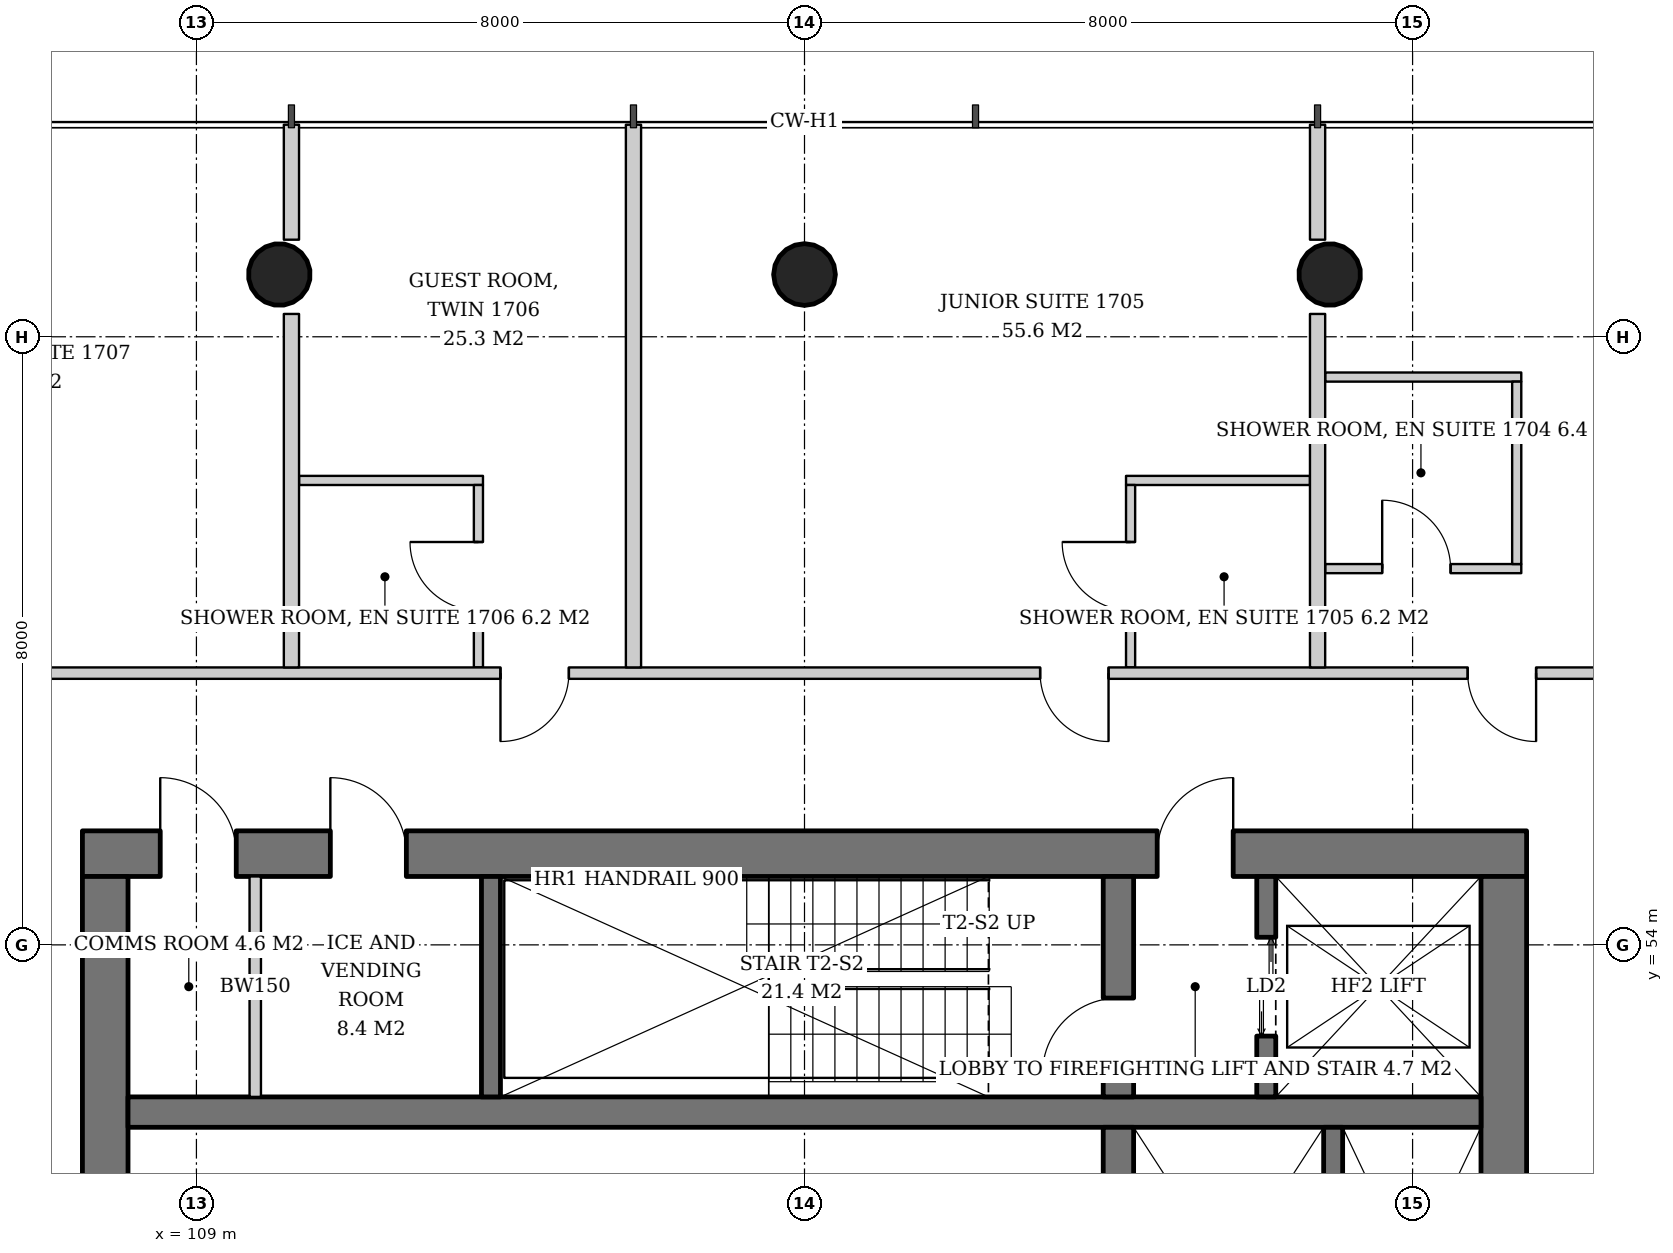
"""IFC4 building model, lengths in metres.
Left out: names, types, materials, properties, quantities, classifications, styles, units other than length and angle.
Written with IfcOpenShell. Run it as: python <this file> out.ifc"""

import sys

from ifc_helpers import new_model, si_unit, direction, frame, frame_2d, origin, origin_2d, place, context, subcontext, project, spatial, rectangle, hollow_circle, extrude, element, fill, save


model = new_model("IFC4")
c1 = context("Model", 3, precision=1e-05, world=origin(), true_north=direction((0.0, 1.0)))
c2 = subcontext(c1, "Body", "Model", "MODEL_VIEW")
j1 = project(units=[si_unit("LENGTHUNIT", "METRE"), si_unit("PLANEANGLEUNIT", "RADIAN")], contexts=[c1])
p1 = place(None, origin())
s1 = spatial("IfcSite", under=j1, at=p1, CompositionType="ELEMENT")
p2 = place(p1, origin())
s2 = spatial("IfcBuilding", under=s1, at=p2, CompositionType="ELEMENT")
p3 = place(p2, frame((0.0, 0.0, 70.4)))
s3 = spatial("IfcBuildingStorey", under=s2, at=p3, CompositionType="ELEMENT", Elevation=70.4)
p4 = place(p3, frame((123.935, 62.871, 0.0), z_axis=(-0.021497706284, -0.043059584825, 0.998841188968), x_axis=(0.894693706707, -0.446680166538, 0.0)))
e1 = element("IfcColumn", 1, at=p4, inside=s3, PredefinedType="COLUMN", context=c2, shape_type="SweptSolid", body=[
    extrude(hollow_circle(Radius=0.406, WallThickness=0.03, at=origin_2d()), origin(), (0.0, 0.0, 1.0), 3.804),
])
p5 = place(p3, frame((117.0, 62.871, 0.0), z_axis=(0.0, -0.043069538298, 0.999072076915), x_axis=(1.0, 0.0, 0.0)))
e2 = element("IfcColumn", 2, at=p5, inside=s3, PredefinedType="COLUMN", context=c2, shape_type="SweptSolid", body=[
    extrude(hollow_circle(Radius=0.406, WallThickness=0.03, at=origin_2d()), origin(), (0.0, 0.0, 1.0), 3.803),
])
p6 = place(p3, frame((110.065, 62.871, 0.0), z_axis=(0.021497706284, -0.043059584825, 0.998841188968), x_axis=(0.894693706707, 0.446680166538, 0.0)))
e3 = element("IfcColumn", 3, at=p6, inside=s3, PredefinedType="COLUMN", context=c2, shape_type="SweptSolid", body=[
    extrude(hollow_circle(Radius=0.406, WallThickness=0.03, at=origin_2d()), origin(), (0.0, 0.0, 1.0), 3.804),
])
p7 = place(p3, frame((107.5, 55.2, 0.0), z_axis=(0.0, 0.0, 1.0), x_axis=(1.0, 0.0, 0.0)))
e4 = element("IfcWall", 4, at=p7, inside=s3, PredefinedType="SHEAR", context=c2, shape_type="SweptSolid", body=[
    extrude(rectangle(XDim=19.0, YDim=0.6, at=frame_2d((9.5, 0.0))), origin(), (0.0, 0.0, 1.0), 3.8),
])
p8 = place(p7, frame((14.14, 0.0, 0.0)))
e5 = element("IfcOpeningElement", 5, at=p8, cuts=e4, PredefinedType="OPENING", context=c2, shape_type="SweptSolid", body=[
    extrude(rectangle(XDim=1.0, YDim=2.1, at=frame_2d((0.5, 1.05))), frame((0.0, 0.31, 0.0), z_axis=(0.0, -1.0, 0.0), x_axis=(1.0, 0.0, 0.0)), (0.0, 0.0, 1.0), 0.62),
])
p9 = place(p7, frame((1.024, 0.0, 0.0)))
e6 = element("IfcOpeningElement", 6, at=p9, cuts=e4, PredefinedType="OPENING", context=c2, shape_type="SweptSolid", body=[
    extrude(rectangle(XDim=1.0, YDim=2.1, at=frame_2d((0.5, 1.05))), frame((0.0, 0.31, 0.0), z_axis=(0.0, -1.0, 0.0), x_axis=(1.0, 0.0, 0.0)), (0.0, 0.0, 1.0), 0.62),
])
p10 = place(p7, frame((3.262, 0.0, 0.0)))
e7 = element("IfcOpeningElement", 7, at=p10, cuts=e4, PredefinedType="OPENING", context=c2, shape_type="SweptSolid", body=[
    extrude(rectangle(XDim=1.0, YDim=2.1, at=frame_2d((0.5, 1.05))), frame((0.0, 0.31, 0.0), z_axis=(0.0, -1.0, 0.0), x_axis=(1.0, 0.0, 0.0)), (0.0, 0.0, 1.0), 0.62),
])
p11 = place(p3, frame((107.8, 37.1, 0.0), z_axis=(0.0, 0.0, 1.0), x_axis=(0.0, 1.0, 0.0)))
e8 = element("IfcWall", 8, at=p11, inside=s3, PredefinedType="SHEAR", context=c2, shape_type="SweptSolid", body=[
    extrude(rectangle(XDim=17.8, YDim=0.6, at=frame_2d((8.9, 0.0))), origin(), (0.0, 0.0, 1.0), 3.8),
])
p12 = place(p11, frame((8.0, 0.0, 0.0)))
e9 = element("IfcOpeningElement", 9, at=p12, cuts=e8, PredefinedType="OPENING", context=c2, shape_type="SweptSolid", body=[
    extrude(rectangle(XDim=1.8, YDim=2.4, at=frame_2d((0.9, 1.2))), frame((0.0, 0.31, 0.0), z_axis=(0.0, -1.0, 0.0), x_axis=(1.0, 0.0, 0.0)), (0.0, 0.0, 1.0), 0.62),
])
p13 = place(p3, frame((126.2, 37.1, 0.0), z_axis=(0.0, 0.0, 1.0), x_axis=(0.0, 1.0, 0.0)))
e10 = element("IfcWall", 10, at=p13, inside=s3, PredefinedType="SHEAR", context=c2, shape_type="SweptSolid", body=[
    extrude(rectangle(XDim=17.8, YDim=0.6, at=frame_2d((8.9, 0.0))), origin(), (0.0, 0.0, 1.0), 3.8),
])
p14 = place(p13, frame((8.0, 0.0, 0.0)))
e11 = element("IfcOpeningElement", 11, at=p14, cuts=e10, PredefinedType="OPENING", context=c2, shape_type="SweptSolid", body=[
    extrude(rectangle(XDim=1.8, YDim=2.4, at=frame_2d((0.9, 1.2))), frame((0.0, 0.31, 0.0), z_axis=(0.0, -1.0, 0.0), x_axis=(1.0, 0.0, 0.0)), (0.0, 0.0, 1.0), 0.62),
])
p15 = place(p3, frame((108.1, 51.8, 0.0), z_axis=(0.0, 0.0, 1.0), x_axis=(1.0, 0.0, 0.0)))
e12 = element("IfcWall", 12, at=p15, inside=s3, PredefinedType="SHEAR", context=c2, shape_type="SweptSolid", body=[
    extrude(rectangle(XDim=17.8, YDim=0.4, at=frame_2d((8.9, 0.0))), origin(), (0.0, 0.0, 1.0), 3.8),
])
p16 = place(p3, frame((121.13, 40.4, 0.0), z_axis=(0.0, 0.0, 1.0), x_axis=(0.0, 1.0, 0.0)))
e13 = element("IfcWall", 13, at=p16, inside=s3, PredefinedType="SHEAR", context=c2, shape_type="SweptSolid", body=[
    extrude(rectangle(XDim=11.2, YDim=0.4, at=frame_2d((5.6, 0.0))), origin(), (0.0, 0.0, 1.0), 3.8),
])
p17 = place(p3, frame((121.13, 52.0, 0.0), z_axis=(0.0, 0.0, 1.0), x_axis=(0.0, 1.0, 0.0)))
e14 = element("IfcWall", 14, at=p17, inside=s3, PredefinedType="SHEAR", context=c2, shape_type="SweptSolid", body=[
    extrude(rectangle(XDim=2.9, YDim=0.4, at=frame_2d((1.45, 0.0))), origin(), (0.0, 0.0, 1.0), 3.8),
])
p18 = place(p17, frame((0.3, 0.0, 0.0)))
e15 = element("IfcOpeningElement", 15, at=p18, cuts=e14, PredefinedType="OPENING", context=c2, shape_type="SweptSolid", body=[
    extrude(rectangle(XDim=1.0, YDim=2.1, at=frame_2d((0.5, 1.05))), frame((0.0, 0.21, 0.0), z_axis=(0.0, -1.0, 0.0), x_axis=(1.0, 0.0, 0.0)), (0.0, 0.0, 1.0), 0.42),
])
p19 = place(p3, frame((112.875, 52.0, 0.0), z_axis=(0.0, 0.0, 1.0), x_axis=(0.0, 1.0, 0.0)))
e16 = element("IfcWall", 16, at=p19, inside=s3, PredefinedType="SHEAR", context=c2, shape_type="SweptSolid", body=[
    extrude(rectangle(XDim=2.9, YDim=0.25, at=frame_2d((1.45, 0.0))), origin(), (0.0, 0.0, 1.0), 3.8),
])
p20 = place(p3, frame((123.075, 52.0, 0.0), z_axis=(0.0, 0.0, 1.0), x_axis=(0.0, 1.0, 0.0)))
e17 = element("IfcWall", 17, at=p20, inside=s3, PredefinedType="SHEAR", context=c2, shape_type="SweptSolid", body=[
    extrude(rectangle(XDim=2.9, YDim=0.25, at=frame_2d((1.45, 0.0))), origin(), (0.0, 0.0, 1.0), 3.8),
])
p21 = place(p20, frame((0.8, 0.0, 0.0)))
e18 = element("IfcOpeningElement", 18, at=p21, cuts=e17, PredefinedType="OPENING", context=c2, shape_type="SweptSolid", body=[
    extrude(rectangle(XDim=1.3, YDim=2.2, at=frame_2d((0.65, 1.1))), frame((0.0, 0.135, 0.0), z_axis=(0.0, -1.0, 0.0), x_axis=(1.0, 0.0, 0.0)), (0.0, 0.0, 1.0), 0.27),
])
p22 = place(p3, frame((123.955, 47.75, 0.0), z_axis=(0.0, 0.0, 1.0), x_axis=(0.0, 1.0, 0.0)))
e19 = element("IfcWall", 19, at=p22, inside=s3, PredefinedType="SHEAR", context=c2, shape_type="SweptSolid", body=[
    extrude(rectangle(XDim=3.85, YDim=0.25, at=frame_2d((1.925, 0.0))), origin(), (0.0, 0.0, 1.0), 3.8),
])
p23 = place(p3, frame((109.774, 52.0, 0.0), z_axis=(0.0, 0.0, 1.0), x_axis=(0.0, 1.0, 0.0)))
e20 = element("IfcWall", 20, at=p23, inside=s3, PredefinedType="SOLIDWALL", context=c2, shape_type="SweptSolid", body=[
    extrude(rectangle(XDim=2.9, YDim=0.15, at=frame_2d((1.45, 0.0))), origin(), (0.0, 0.0, 1.0), 3.6),
])
p24 = place(p3, frame((123.85, 58.95, 0.0), z_axis=(0.0, 0.0, 1.0), x_axis=(1.0, 0.0, 0.0)))
e21 = element("IfcWall", 21, at=p24, inside=s3, PredefinedType="PARTITIONING", context=c2, shape_type="SweptSolid", body=[
    extrude(rectangle(XDim=2.58, YDim=0.12, at=frame_2d((1.29, 0.0))), origin(), (0.0, 0.0, 1.0), 2.8),
])
p25 = place(p24, frame((0.75, 0.0, 0.0)))
e22 = element("IfcOpeningElement", 22, at=p25, cuts=e21, PredefinedType="OPENING", context=c2, shape_type="SweptSolid", body=[
    extrude(rectangle(XDim=0.9, YDim=2.1, at=frame_2d((0.45, 1.05))), frame((0.0, 0.07, 0.0), z_axis=(0.0, -1.0, 0.0), x_axis=(1.0, 0.0, 0.0)), (0.0, 0.0, 1.0), 0.14),
])
p26 = place(p3, frame((123.85, 61.47, 0.0), z_axis=(0.0, 0.0, 1.0), x_axis=(1.0, 0.0, 0.0)))
e23 = element("IfcWall", 23, at=p26, inside=s3, PredefinedType="PARTITIONING", context=c2, shape_type="SweptSolid", body=[
    extrude(rectangle(XDim=2.58, YDim=0.12, at=frame_2d((1.29, 0.0))), origin(), (0.0, 0.0, 1.0), 2.8),
])
p27 = place(p3, frame((126.37, 59.01, 0.0), z_axis=(0.0, 0.0, 1.0), x_axis=(0.0, 1.0, 0.0)))
e24 = element("IfcWall", 24, at=p27, inside=s3, PredefinedType="PARTITIONING", context=c2, shape_type="SweptSolid", body=[
    extrude(rectangle(XDim=2.4, YDim=0.12, at=frame_2d((1.2, 0.0))), origin(), (0.0, 0.0, 1.0), 2.8),
])
p28 = place(p3, frame((123.65, 60.11, 0.0), z_axis=(0.0, 0.0, 1.0), x_axis=(-1.0, 0.0, 0.0)))
e25 = element("IfcWall", 25, at=p28, inside=s3, PredefinedType="PARTITIONING", context=c2, shape_type="SweptSolid", body=[
    extrude(rectangle(XDim=2.42, YDim=0.12, at=frame_2d((1.21, 0.0))), origin(), (0.0, 0.0, 1.0), 2.847),
])
p29 = place(p3, frame((121.29, 57.65, 0.0), z_axis=(0.0, 0.0, 1.0), x_axis=(0.0, 1.0, 0.0)))
e26 = element("IfcWall", 26, at=p29, inside=s3, PredefinedType="PARTITIONING", context=c2, shape_type="SweptSolid", body=[
    extrude(rectangle(XDim=2.4, YDim=0.12, at=frame_2d((1.2, 0.0))), origin(), (0.0, 0.0, 1.0), 3.6),
])
p30 = place(p29, frame((0.75, 0.0, 0.0)))
e27 = element("IfcOpeningElement", 27, at=p30, cuts=e26, PredefinedType="OPENING", context=c2, shape_type="SweptSolid", body=[
    extrude(rectangle(XDim=0.9, YDim=2.1, at=frame_2d((0.45, 1.05))), frame((0.0, 0.07, 0.0), z_axis=(0.0, -1.0, 0.0), x_axis=(1.0, 0.0, 0.0)), (0.0, 0.0, 1.0), 0.14),
])
p31 = place(p3, frame((112.77, 60.11, 0.0), z_axis=(0.0, 0.0, 1.0), x_axis=(-1.0, 0.0, 0.0)))
e28 = element("IfcWall", 28, at=p31, inside=s3, PredefinedType="PARTITIONING", context=c2, shape_type="SweptSolid", body=[
    extrude(rectangle(XDim=2.42, YDim=0.12, at=frame_2d((1.21, 0.0))), origin(), (0.0, 0.0, 1.0), 3.6),
])
p32 = place(p3, frame((112.71, 57.65, 0.0), z_axis=(0.0, 0.0, 1.0), x_axis=(0.0, 1.0, 0.0)))
e29 = element("IfcWall", 29, at=p32, inside=s3, PredefinedType="PARTITIONING", context=c2, shape_type="SweptSolid", body=[
    extrude(rectangle(XDim=2.4, YDim=0.12, at=frame_2d((1.2, 0.0))), origin(), (0.0, 0.0, 1.0), 3.6),
])
p33 = place(p32, frame((0.75, 0.0, 0.0)))
e30 = element("IfcOpeningElement", 30, at=p33, cuts=e29, PredefinedType="OPENING", context=c2, shape_type="SweptSolid", body=[
    extrude(rectangle(XDim=0.9, YDim=2.1, at=frame_2d((0.45, 1.05))), frame((0.0, 0.07, 0.0), z_axis=(0.0, -1.0, 0.0), x_axis=(1.0, 0.0, 0.0)), (0.0, 0.0, 1.0), 0.14),
])
p34 = place(p3, frame((128.65, 57.575, 0.0), z_axis=(0.0, 0.0, 1.0), x_axis=(-1.0, 0.0, 0.0)))
e31 = element("IfcWall", 31, at=p34, inside=s3, PredefinedType="PARTITIONING", context=c2, shape_type="SweptSolid", body=[
    extrude(rectangle(XDim=23.15, YDim=0.15, at=frame_2d((11.575, 0.0))), origin(), (0.0, 0.0, 1.0), 2.8),
])
p35 = place(p34, frame((2.025, 0.0, 0.0)))
e32 = element("IfcOpeningElement", 32, at=p35, cuts=e31, PredefinedType="OPENING", context=c2, shape_type="SweptSolid", body=[
    extrude(rectangle(XDim=0.9, YDim=2.1, at=frame_2d((0.45, 1.05))), frame((0.0, 0.085, 0.0), z_axis=(0.0, -1.0, 0.0), x_axis=(1.0, 0.0, 0.0)), (0.0, 0.0, 1.0), 0.17),
])
p36 = place(p34, frame((7.65, 0.0, 0.0)))
e33 = element("IfcOpeningElement", 33, at=p36, cuts=e31, PredefinedType="OPENING", context=c2, shape_type="SweptSolid", body=[
    extrude(rectangle(XDim=0.9, YDim=2.1, at=frame_2d((0.45, 1.05))), frame((0.0, 0.085, 0.0), z_axis=(0.0, -1.0, 0.0), x_axis=(1.0, 0.0, 0.0)), (0.0, 0.0, 1.0), 0.17),
])
p37 = place(p34, frame((14.75, 0.0, 0.0)))
e34 = element("IfcOpeningElement", 34, at=p37, cuts=e31, PredefinedType="OPENING", context=c2, shape_type="SweptSolid", body=[
    extrude(rectangle(XDim=0.9, YDim=2.1, at=frame_2d((0.45, 1.05))), frame((0.0, 0.085, 0.0), z_axis=(0.0, -1.0, 0.0), x_axis=(1.0, 0.0, 0.0)), (0.0, 0.0, 1.0), 0.17),
])
p38 = place(p3, frame((123.75, 57.65, 0.0), z_axis=(0.0, 0.0, 1.0), x_axis=(0.0, 1.0, 0.0)))
e35 = element("IfcWall", 35, at=p38, inside=s3, PredefinedType="PARTITIONING", context=c2, shape_type="SweptSolid", body=[
    extrude(rectangle(XDim=4.65, YDim=0.2, at=frame_2d((2.325, 0.0))), origin(), (0.0, 0.0, 1.0), 3.6),
])
p39 = place(p3, frame((123.75, 63.277, 0.0), z_axis=(0.0, 0.0, 1.0), x_axis=(0.0, 1.0, 0.0)))
e36 = element("IfcWall", 36, at=p39, inside=s3, PredefinedType="PARTITIONING", context=c2, shape_type="SweptSolid", body=[
    extrude(rectangle(XDim=1.513, YDim=0.2, at=frame_2d((0.756, 0.0))), origin(), (0.0, 0.0, 1.0), 3.6),
])
p40 = place(p3, frame((114.75, 57.65, 0.0), z_axis=(0.0, 0.0, 1.0), x_axis=(0.0, 1.0, 0.0)))
e37 = element("IfcWall", 37, at=p40, inside=s3, PredefinedType="PARTITIONING", context=c2, shape_type="SweptSolid", body=[
    extrude(rectangle(XDim=7.14, YDim=0.2, at=frame_2d((3.57, 0.0))), origin(), (0.0, 0.0, 1.0), 3.05),
])
p41 = place(p3, frame((110.25, 57.65, 0.0), z_axis=(0.0, 0.0, 1.0), x_axis=(0.0, 1.0, 0.0)))
e38 = element("IfcWall", 38, at=p41, inside=s3, PredefinedType="PARTITIONING", context=c2, shape_type="SweptSolid", body=[
    extrude(rectangle(XDim=4.65, YDim=0.2, at=frame_2d((2.325, 0.0))), origin(), (0.0, 0.0, 1.0), 3.6),
])
p42 = place(p3, frame((110.25, 63.277, 0.0), z_axis=(0.0, 0.0, 1.0), x_axis=(0.0, 1.0, 0.0)))
e39 = element("IfcWall", 39, at=p42, inside=s3, PredefinedType="PARTITIONING", context=c2, shape_type="SweptSolid", body=[
    extrude(rectangle(XDim=1.513, YDim=0.2, at=frame_2d((0.756, 0.0))), origin(), (0.0, 0.0, 1.0), 3.6),
])
p43 = place(p21, origin())
e40 = element("IfcDoor", 40, at=p43, inside=s3, OperationType="DOUBLE_DOOR_SLIDING", PredefinedType="DOOR", context=c2, shape_type="SweptSolid", body=[
    extrude(rectangle(XDim=1.3, YDim=2.2, at=frame_2d((0.65, 1.1))), frame((0.0, 0.025, 0.0), z_axis=(0.0, -1.0, 0.0), x_axis=(1.0, 0.0, 0.0)), (0.0, 0.0, 1.0), 0.05),
])
fill(e18, e40)
p44 = place(p18, origin())
e41 = element("IfcDoor", 41, at=p44, inside=s3, OperationType="SINGLE_SWING_LEFT", PredefinedType="DOOR", context=c2, shape_type="SweptSolid", body=[
    extrude(rectangle(XDim=1.0, YDim=2.1, at=frame_2d((0.5, 1.05))), frame((0.0, 0.025, 0.0), z_axis=(0.0, -1.0, 0.0), x_axis=(1.0, 0.0, 0.0)), (0.0, 0.0, 1.0), 0.05),
])
fill(e15, e41)
p45 = place(p8, origin())
e42 = element("IfcDoor", 42, at=p45, inside=s3, OperationType="SINGLE_SWING_RIGHT", PredefinedType="DOOR", context=c2, shape_type="SweptSolid", body=[
    extrude(rectangle(XDim=1.0, YDim=2.1, at=frame_2d((0.5, 1.05))), frame((0.0, 0.025, 0.0), z_axis=(0.0, -1.0, 0.0), x_axis=(1.0, 0.0, 0.0)), (0.0, 0.0, 1.0), 0.05),
])
fill(e5, e42)
p46 = place(p9, origin())
e43 = element("IfcDoor", 43, at=p46, inside=s3, OperationType="SINGLE_SWING_LEFT", PredefinedType="DOOR", context=c2, shape_type="SweptSolid", body=[
    extrude(rectangle(XDim=1.0, YDim=2.1, at=frame_2d((0.5, 1.05))), frame((0.0, -0.24, 0.0), z_axis=(0.0, -1.0, 0.0), x_axis=(1.0, 0.0, 0.0)), (0.0, 0.0, 1.0), 0.05),
])
fill(e6, e43)
p47 = place(p10, origin())
e44 = element("IfcDoor", 44, at=p47, inside=s3, OperationType="SINGLE_SWING_LEFT", PredefinedType="DOOR", context=c2, shape_type="SweptSolid", body=[
    extrude(rectangle(XDim=1.0, YDim=2.1, at=frame_2d((0.5, 1.05))), frame((0.0, -0.24, 0.0), z_axis=(0.0, -1.0, 0.0), x_axis=(1.0, 0.0, 0.0)), (0.0, 0.0, 1.0), 0.05),
])
fill(e7, e44)
p48 = place(p25, origin())
e45 = element("IfcDoor", 45, at=p48, inside=s3, OperationType="SINGLE_SWING_LEFT", PredefinedType="DOOR", context=c2, shape_type="SweptSolid", body=[
    extrude(rectangle(XDim=0.9, YDim=2.1, at=frame_2d((0.45, 1.05))), frame((0.0, 0.025, 0.0), z_axis=(0.0, -1.0, 0.0), x_axis=(1.0, 0.0, 0.0)), (0.0, 0.0, 1.0), 0.05),
])
fill(e22, e45)
p49 = place(p30, origin())
e46 = element("IfcDoor", 46, at=p49, inside=s3, OperationType="SINGLE_SWING_RIGHT", PredefinedType="DOOR", context=c2, shape_type="SweptSolid", body=[
    extrude(rectangle(XDim=0.9, YDim=2.1, at=frame_2d((0.45, 1.05))), frame((0.0, 0.025, 0.0), z_axis=(0.0, -1.0, 0.0), x_axis=(1.0, 0.0, 0.0)), (0.0, 0.0, 1.0), 0.05),
])
fill(e27, e46)
p50 = place(p33, origin())
e47 = element("IfcDoor", 47, at=p50, inside=s3, OperationType="SINGLE_SWING_RIGHT", PredefinedType="DOOR", context=c2, shape_type="SweptSolid", body=[
    extrude(rectangle(XDim=0.9, YDim=2.1, at=frame_2d((0.45, 1.05))), frame((0.0, 0.025, 0.0), z_axis=(0.0, -1.0, 0.0), x_axis=(1.0, 0.0, 0.0)), (0.0, 0.0, 1.0), 0.05),
])
fill(e30, e47)
p51 = place(p35, origin())
e48 = element("IfcDoor", 48, at=p51, inside=s3, OperationType="SINGLE_SWING_LEFT", PredefinedType="DOOR", context=c2, shape_type="SweptSolid", body=[
    extrude(rectangle(XDim=0.9, YDim=2.1, at=frame_2d((0.45, 1.05))), frame((0.0, 0.025, 0.0), z_axis=(0.0, -1.0, 0.0), x_axis=(1.0, 0.0, 0.0)), (0.0, 0.0, 1.0), 0.05),
])
fill(e32, e48)
p52 = place(p36, origin())
e49 = element("IfcDoor", 49, at=p52, inside=s3, OperationType="SINGLE_SWING_LEFT", PredefinedType="DOOR", context=c2, shape_type="SweptSolid", body=[
    extrude(rectangle(XDim=0.9, YDim=2.1, at=frame_2d((0.45, 1.05))), frame((0.0, 0.025, 0.0), z_axis=(0.0, -1.0, 0.0), x_axis=(1.0, 0.0, 0.0)), (0.0, 0.0, 1.0), 0.05),
])
fill(e33, e49)
p53 = place(p37, origin())
e50 = element("IfcDoor", 50, at=p53, inside=s3, OperationType="SINGLE_SWING_RIGHT", PredefinedType="DOOR", context=c2, shape_type="SweptSolid", body=[
    extrude(rectangle(XDim=0.9, YDim=2.1, at=frame_2d((0.45, 1.05))), frame((0.0, 0.025, 0.0), z_axis=(0.0, -1.0, 0.0), x_axis=(1.0, 0.0, 0.0)), (0.0, 0.0, 1.0), 0.05),
])
fill(e34, e50)
save(model, sys.argv[1])
